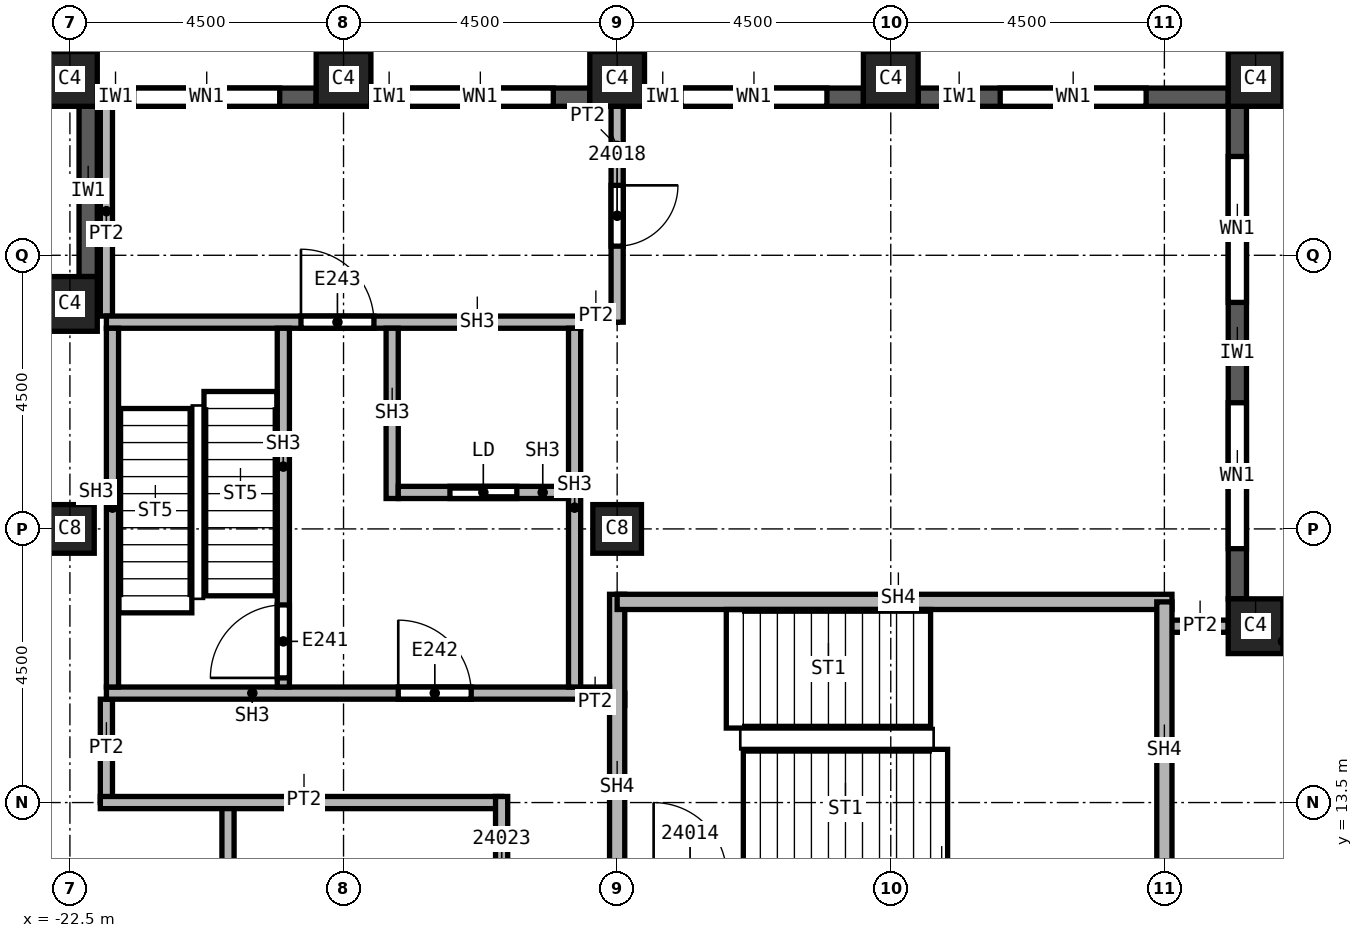
"""IFC4 building model, lengths in metres.
Left out: names, types, materials, properties, quantities, classifications, styles, units other than length and angle.
Written with IfcOpenShell. Run it as: python <this file> out.ifc"""

import sys

from ifc_helpers import new_model, si_unit, direction, frame, frame_2d, origin, origin_2d, place, context, subcontext, project, spatial, rectangle, extrude, element, fill, save


model = new_model("IFC4")
c1 = context("Model", 3, precision=1e-05, world=origin(), true_north=direction((0.0, 1.0)))
c2 = subcontext(c1, "Body", "Model", "MODEL_VIEW")
j1 = project(units=[si_unit("LENGTHUNIT", "METRE"), si_unit("PLANEANGLEUNIT", "RADIAN")], contexts=[c1])
p1 = place(None, origin())
s1 = spatial("IfcSite", under=j1, at=p1, CompositionType="ELEMENT")
p2 = place(p1, origin())
s2 = spatial("IfcBuilding", under=s1, at=p2, CompositionType="ELEMENT")
p3 = place(p2, frame((0.0, 0.0, 342.0)))
s3 = spatial("IfcBuildingStorey", under=s2, at=p3, CompositionType="ELEMENT", Elevation=342.0)
for number, where, z_axis, x_axis in (
    (1, (-13.5, 18.0, 0.0), (0.0, 0.0, 1.0), (1.0, 0.0, 0.0)),
    (2, (-22.5, 18.0, 0.0), (0.0, 0.0, 1.0), (1.0, 0.0, 0.0)),
):
    element("IfcColumn", number, at=place(p3, frame(where, z_axis=z_axis, x_axis=x_axis)), inside=s3, PredefinedType="COLUMN", context=c2, shape_type="SweptSolid", body=[
        extrude(rectangle(XDim=0.8, YDim=0.8, at=origin_2d()), origin(), (0.0, 0.0, 1.0), 3.74),
    ])
for number, where, z_axis, x_axis in (
    (3, (-3.0, 25.4, 0.0), (0.0, 0.0, 1.0), (1.0, 0.0, 0.0)),
    (4, (-9.0, 25.4, 0.0), (0.0, 0.0, 1.0), (1.0, 0.0, 0.0)),
    (5, (-13.5, 25.4, 0.0), (0.0, 0.0, 1.0), (1.0, 0.0, 0.0)),
    (6, (-18.0, 25.4, 0.0), (0.0, 0.0, 1.0), (1.0, 0.0, 0.0)),
    (7, (-22.5, 25.4, 0.0), (0.0, 0.0, 1.0), (1.0, 0.0, 0.0)),
    (8, (-3.0, 16.4, 0.0), (0.0, 0.0, 1.0), (1.0, 0.0, 0.0)),
    (9, (-22.5, 21.7, 0.0), (0.0, 0.0, 1.0), (1.0, 0.0, 0.0)),
):
    element("IfcColumn", number, at=place(p3, frame(where, z_axis=z_axis, x_axis=x_axis)), inside=s3, PredefinedType="COLUMN", context=c2, shape_type="SweptSolid", body=[
        extrude(rectangle(XDim=0.9, YDim=0.9, at=origin_2d()), origin(), (0.0, 0.0, 1.0), 3.74),
    ])
p4 = place(p3, frame((-3.3, 16.85, 0.0), z_axis=(0.0, 0.0, 1.0), x_axis=(0.0, 1.0, 0.0)))
e10 = element("IfcWall", 10, at=p4, inside=s3, PredefinedType="SOLIDWALL", context=c2, shape_type="SweptSolid", body=[
    extrude(rectangle(XDim=8.1, YDim=0.3, at=frame_2d((4.05, 0.0))), origin(), (0.0, 0.0, 1.0), 3.14),
])
p5 = place(p4, frame((0.825, 0.0, 0.8)))
e11 = element("IfcOpeningElement", 11, at=p5, cuts=e10, PredefinedType="OPENING", context=c2, shape_type="SweptSolid", body=[
    extrude(rectangle(XDim=2.4, YDim=1.95, at=frame_2d((1.2, 0.975))), frame((0.0, 0.15, 0.0), z_axis=(0.0, -1.0, 0.0), x_axis=(1.0, 0.0, 0.0)), (0.0, 0.0, 1.0), 0.3),
])
p6 = place(p4, frame((4.875, 0.0, 0.8)))
e12 = element("IfcOpeningElement", 12, at=p6, cuts=e10, PredefinedType="OPENING", context=c2, shape_type="SweptSolid", body=[
    extrude(rectangle(XDim=2.4, YDim=1.95, at=frame_2d((1.2, 0.975))), frame((0.0, 0.15, 0.0), z_axis=(0.0, -1.0, 0.0), x_axis=(1.0, 0.0, 0.0)), (0.0, 0.0, 1.0), 0.3),
])
p7 = place(p3, frame((-3.45, 25.1, 0.0), z_axis=(0.0, 0.0, 1.0), x_axis=(-1.0, 0.0, 0.0)))
e13 = element("IfcWall", 13, at=p7, inside=s3, PredefinedType="SOLIDWALL", context=c2, shape_type="SweptSolid", body=[
    extrude(rectangle(XDim=5.1, YDim=0.3, at=frame_2d((2.55, 0.0))), origin(), (0.0, 0.0, 1.0), 3.14),
])
p8 = place(p7, frame((1.35, 0.0, 0.8)))
e14 = element("IfcOpeningElement", 14, at=p8, cuts=e13, PredefinedType="OPENING", context=c2, shape_type="SweptSolid", body=[
    extrude(rectangle(XDim=2.4, YDim=1.95, at=frame_2d((1.2, 0.975))), frame((0.0, 0.15, 0.0), z_axis=(0.0, -1.0, 0.0), x_axis=(1.0, 0.0, 0.0)), (0.0, 0.0, 1.0), 0.3),
])
p9 = place(p3, frame((-9.45, 25.1, 0.0), z_axis=(0.0, 0.0, 1.0), x_axis=(-1.0, 0.0, 0.0)))
e15 = element("IfcWall", 15, at=p9, inside=s3, PredefinedType="SOLIDWALL", context=c2, shape_type="SweptSolid", body=[
    extrude(rectangle(XDim=3.6, YDim=0.3, at=frame_2d((1.8, 0.0))), origin(), (0.0, 0.0, 1.0), 3.14),
])
p10 = place(p9, frame((0.6, 0.0, 0.8)))
e16 = element("IfcOpeningElement", 16, at=p10, cuts=e15, PredefinedType="OPENING", context=c2, shape_type="SweptSolid", body=[
    extrude(rectangle(XDim=2.4, YDim=1.95, at=frame_2d((1.2, 0.975))), frame((0.0, 0.15, 0.0), z_axis=(0.0, -1.0, 0.0), x_axis=(1.0, 0.0, 0.0)), (0.0, 0.0, 1.0), 0.3),
])
p11 = place(p3, frame((-13.95, 25.1, 0.0), z_axis=(0.0, 0.0, 1.0), x_axis=(-1.0, 0.0, 0.0)))
e17 = element("IfcWall", 17, at=p11, inside=s3, PredefinedType="SOLIDWALL", context=c2, shape_type="SweptSolid", body=[
    extrude(rectangle(XDim=3.6, YDim=0.3, at=frame_2d((1.8, 0.0))), origin(), (0.0, 0.0, 1.0), 3.14),
])
p12 = place(p11, frame((0.6, 0.0, 0.8)))
e18 = element("IfcOpeningElement", 18, at=p12, cuts=e17, PredefinedType="OPENING", context=c2, shape_type="SweptSolid", body=[
    extrude(rectangle(XDim=2.4, YDim=1.95, at=frame_2d((1.2, 0.975))), frame((0.0, 0.15, 0.0), z_axis=(0.0, -1.0, 0.0), x_axis=(1.0, 0.0, 0.0)), (0.0, 0.0, 1.0), 0.3),
])
p13 = place(p3, frame((-18.45, 25.1, 0.0), z_axis=(0.0, 0.0, 1.0), x_axis=(-1.0, 0.0, 0.0)))
e19 = element("IfcWall", 19, at=p13, inside=s3, PredefinedType="SOLIDWALL", context=c2, shape_type="SweptSolid", body=[
    extrude(rectangle(XDim=3.6, YDim=0.3, at=frame_2d((1.8, 0.0))), origin(), (0.0, 0.0, 1.0), 3.14),
])
p14 = place(p13, frame((0.6, 0.0, 0.8)))
e20 = element("IfcOpeningElement", 20, at=p14, cuts=e19, PredefinedType="OPENING", context=c2, shape_type="SweptSolid", body=[
    extrude(rectangle(XDim=2.4, YDim=1.95, at=frame_2d((1.2, 0.975))), frame((0.0, 0.15, 0.0), z_axis=(0.0, -1.0, 0.0), x_axis=(1.0, 0.0, 0.0)), (0.0, 0.0, 1.0), 0.3),
])
p15 = place(p3, frame((-22.2, 24.95, 0.0), z_axis=(0.0, 0.0, 1.0), x_axis=(0.0, -1.0, 0.0)))
e21 = element("IfcWall", 21, at=p15, inside=s3, PredefinedType="SOLIDWALL", context=c2, shape_type="SweptSolid", body=[
    extrude(rectangle(XDim=2.8, YDim=0.3, at=frame_2d((1.4, 0.0))), origin(), (0.0, 0.0, 1.0), 3.14),
])
p16 = place(p3, frame((-21.9, 13.5, 0.0), z_axis=(0.0, 0.0, 1.0), x_axis=(0.0, 1.0, 0.0)))
e22 = element("IfcWall", 22, at=p16, inside=s3, PredefinedType="PARTITIONING", context=c2, shape_type="SweptSolid", body=[
    extrude(rectangle(XDim=1.7, YDim=0.2, at=frame_2d((0.85, 0.0))), origin(), (0.0, 0.0, 1.0), 3.74),
])
p17 = place(p3, frame((-21.9, 21.5, 0.0), z_axis=(0.0, 0.0, 1.0), x_axis=(0.0, 1.0, 0.0)))
e23 = element("IfcWall", 23, at=p17, inside=s3, PredefinedType="PARTITIONING", context=c2, shape_type="SweptSolid", body=[
    extrude(rectangle(XDim=3.45, YDim=0.2, at=frame_2d((1.725, 0.0))), origin(), (0.0, 0.0, 1.0), 3.74),
])
p18 = place(p3, frame((-19.9, -0.1, 0.0), z_axis=(0.0, 0.0, 1.0), x_axis=(0.0, 1.0, 0.0)))
e24 = element("IfcWall", 24, at=p18, inside=s3, PredefinedType="PARTITIONING", context=c2, shape_type="SweptSolid", body=[
    extrude(rectangle(XDim=13.6, YDim=0.2, at=frame_2d((6.8, 0.0))), origin(), (0.0, 0.0, 1.0), 3.74),
])
p19 = place(p18, frame((3.85, 0.0, 0.0)))
e25 = element("IfcOpeningElement", 25, at=p19, cuts=e24, PredefinedType="OPENING", context=c2, shape_type="SweptSolid", body=[
    extrude(rectangle(XDim=1.0, YDim=2.1, at=frame_2d((0.5, 1.05))), frame((0.0, 0.1, 0.0), z_axis=(0.0, -1.0, 0.0), x_axis=(1.0, 0.0, 0.0)), (0.0, 0.0, 1.0), 0.2),
])
p20 = place(p3, frame((-15.4, 13.5, 0.0), z_axis=(0.0, 0.0, 1.0), x_axis=(-1.0, 0.0, 0.0)))
e26 = element("IfcWall", 26, at=p20, inside=s3, PredefinedType="PARTITIONING", context=c2, shape_type="SweptSolid", body=[
    extrude(rectangle(XDim=6.6, YDim=0.2, at=frame_2d((3.3, 0.0))), origin(), (0.0, 0.0, 1.0), 3.74),
])
p21 = place(p3, frame((-15.4, -24.95, 0.0), z_axis=(0.0, 0.0, 1.0), x_axis=(0.0, 1.0, 0.0)))
e27 = element("IfcWall", 27, at=p21, inside=s3, PredefinedType="PARTITIONING", context=c2, shape_type="SweptSolid", body=[
    extrude(rectangle(XDim=38.55, YDim=0.2, at=frame_2d((19.275, 0.0))), origin(), (0.0, 0.0, 1.0), 3.74),
])
p22 = place(p21, frame((30.5, 0.0, 0.0)))
e28 = element("IfcOpeningElement", 28, at=p22, cuts=e27, PredefinedType="OPENING", context=c2, shape_type="SweptSolid", body=[
    extrude(rectangle(XDim=1.0, YDim=2.1, at=frame_2d((0.5, 1.05))), frame((0.0, 0.1, 0.0), z_axis=(0.0, -1.0, 0.0), x_axis=(1.0, 0.0, 0.0)), (0.0, 0.0, 1.0), 0.2),
])
p23 = place(p21, frame((36.35, 0.0, 0.0)))
e29 = element("IfcOpeningElement", 29, at=p23, cuts=e27, PredefinedType="OPENING", context=c2, shape_type="SweptSolid", body=[
    extrude(rectangle(XDim=1.0, YDim=2.1, at=frame_2d((0.5, 1.05))), frame((0.0, 0.1, 0.0), z_axis=(0.0, -1.0, 0.0), x_axis=(1.0, 0.0, 0.0)), (0.0, 0.0, 1.0), 0.2),
])
p24 = place(p21, frame((1.9, 0.0, 0.0)))
e30 = element("IfcOpeningElement", 30, at=p24, cuts=e27, PredefinedType="OPENING", context=c2, shape_type="SweptSolid", body=[
    extrude(rectangle(XDim=1.0, YDim=2.1, at=frame_2d((0.5, 1.05))), frame((0.0, 0.1, 0.0), z_axis=(0.0, -1.0, 0.0), x_axis=(1.0, 0.0, 0.0)), (0.0, 0.0, 1.0), 0.2),
])
p25 = place(p21, frame((5.6, 0.0, 0.0)))
e31 = element("IfcOpeningElement", 31, at=p25, cuts=e27, PredefinedType="OPENING", context=c2, shape_type="SweptSolid", body=[
    extrude(rectangle(XDim=1.0, YDim=2.1, at=frame_2d((0.5, 1.05))), frame((0.0, 0.1, 0.0), z_axis=(0.0, -1.0, 0.0), x_axis=(1.0, 0.0, 0.0)), (0.0, 0.0, 1.0), 0.2),
])
p26 = place(p21, frame((9.35, 0.0, 0.0)))
e32 = element("IfcOpeningElement", 32, at=p26, cuts=e27, PredefinedType="OPENING", context=c2, shape_type="SweptSolid", body=[
    extrude(rectangle(XDim=1.0, YDim=2.1, at=frame_2d((0.5, 1.05))), frame((0.0, 0.1, 0.0), z_axis=(0.0, -1.0, 0.0), x_axis=(1.0, 0.0, 0.0)), (0.0, 0.0, 1.0), 0.2),
])
p27 = place(p21, frame((16.1, 0.0, 0.0)))
e33 = element("IfcOpeningElement", 33, at=p27, cuts=e27, PredefinedType="OPENING", context=c2, shape_type="SweptSolid", body=[
    extrude(rectangle(XDim=1.0, YDim=2.1, at=frame_2d((0.5, 1.05))), frame((0.0, 0.1, 0.0), z_axis=(0.0, -1.0, 0.0), x_axis=(1.0, 0.0, 0.0)), (0.0, 0.0, 1.0), 0.2),
])
p28 = place(p3, frame((-14.1, 15.2, 0.0), z_axis=(0.0, 0.0, 1.0), x_axis=(1.0, 0.0, 0.0)))
e34 = element("IfcWall", 34, at=p28, inside=s3, PredefinedType="PARTITIONING", context=c2, shape_type="SweptSolid", body=[
    extrude(rectangle(XDim=0.725, YDim=0.2, at=frame_2d((0.363, 0.0))), origin(), (0.0, 0.0, 1.0), 3.74),
])
p29 = place(p3, frame((-13.5, 21.5, 0.0), z_axis=(0.0, 0.0, 1.0), x_axis=(-1.0, 0.0, 0.0)))
e35 = element("IfcWall", 35, at=p29, inside=s3, PredefinedType="PARTITIONING", context=c2, shape_type="SweptSolid", body=[
    extrude(rectangle(XDim=0.6, YDim=0.2, at=frame_2d((0.3, 0.0))), origin(), (0.0, 0.0, 1.0), 3.74),
])
p30 = place(p3, frame((-13.5, 24.95, 0.0), z_axis=(0.0, 0.0, 1.0), x_axis=(0.0, -1.0, 0.0)))
e36 = element("IfcWall", 36, at=p30, inside=s3, PredefinedType="PARTITIONING", context=c2, shape_type="SweptSolid", body=[
    extrude(rectangle(XDim=3.55, YDim=0.2, at=frame_2d((1.775, 0.0))), origin(), (0.0, 0.0, 1.0), 3.74),
])
p31 = place(p30, frame((1.3, 0.0, 0.0)))
e37 = element("IfcOpeningElement", 37, at=p31, cuts=e36, PredefinedType="OPENING", context=c2, shape_type="SweptSolid", body=[
    extrude(rectangle(XDim=1.0, YDim=2.1, at=frame_2d((0.5, 1.05))), frame((0.0, 0.1, 0.0), z_axis=(0.0, -1.0, 0.0), x_axis=(1.0, 0.0, 0.0)), (0.0, 0.0, 1.0), 0.2),
])
p32 = place(p3, frame((-4.5, 16.4, 0.0), z_axis=(0.0, 0.0, 1.0), x_axis=(1.0, 0.0, 0.0)))
e38 = element("IfcWall", 38, at=p32, inside=s3, PredefinedType="PARTITIONING", context=c2, shape_type="SweptSolid", body=[
    extrude(rectangle(XDim=1.05, YDim=0.2, at=frame_2d((0.525, 0.0))), origin(), (0.0, 0.0, 1.0), 3.74),
])
p33 = place(p3, frame((-13.5, 12.175, 0.0), z_axis=(0.0, 0.0, 1.0), x_axis=(0.0, 1.0, 0.0)))
e39 = element("IfcWall", 39, at=p33, inside=s3, PredefinedType="SOLIDWALL", context=c2, shape_type="SweptSolid", body=[
    extrude(rectangle(XDim=4.75, YDim=0.25, at=frame_2d((2.375, 0.0))), origin(), (0.0, 0.0, 1.0), 3.74),
])
p34 = place(p3, frame((-13.5, 16.8, 0.0), z_axis=(0.0, 0.0, 1.0), x_axis=(1.0, 0.0, 0.0)))
e40 = element("IfcWall", 40, at=p34, inside=s3, PredefinedType="SOLIDWALL", context=c2, shape_type="SweptSolid", body=[
    extrude(rectangle(XDim=9.125, YDim=0.25, at=frame_2d((4.562, 0.0))), origin(), (0.0, 0.0, 1.0), 3.74),
])
p35 = place(p3, frame((-4.5, 16.8, 0.0), z_axis=(0.0, 0.0, 1.0), x_axis=(0.0, -1.0, 0.0)))
e41 = element("IfcWall", 41, at=p35, inside=s3, PredefinedType="SOLIDWALL", context=c2, shape_type="SweptSolid", body=[
    extrude(rectangle(XDim=4.5, YDim=0.25, at=frame_2d((2.25, 0.0))), origin(), (0.0, 0.0, 1.0), 3.74),
])
p36 = place(p3, frame((-21.9, 15.3, 0.0), z_axis=(0.0, 0.0, 1.0), x_axis=(1.0, 0.0, 0.0)))
e42 = element("IfcWall", 42, at=p36, inside=s3, PredefinedType="SOLIDWALL", context=c2, shape_type="SweptSolid", body=[
    extrude(rectangle(XDim=8.275, YDim=0.2, at=frame_2d((4.137, 0.0))), origin(), (0.0, 0.0, 1.0), 3.74),
])
p37 = place(p36, frame((4.8, 0.0, 0.0)))
e43 = element("IfcOpeningElement", 43, at=p37, cuts=e42, PredefinedType="OPENING", context=c2, shape_type="SweptSolid", body=[
    extrude(rectangle(XDim=1.2, YDim=2.1, at=frame_2d((0.6, 1.05))), frame((0.0, 0.1, 0.0), z_axis=(0.0, -1.0, 0.0), x_axis=(1.0, 0.0, 0.0)), (0.0, 0.0, 1.0), 0.2),
])
p38 = place(p3, frame((-21.9, 21.4, 0.0), z_axis=(0.0, 0.0, 1.0), x_axis=(1.0, 0.0, 0.0)))
e44 = element("IfcWall", 44, at=p38, inside=s3, PredefinedType="SOLIDWALL", context=c2, shape_type="SweptSolid", body=[
    extrude(rectangle(XDim=7.8, YDim=0.2, at=frame_2d((3.9, 0.0))), origin(), (0.0, 0.0, 1.0), 3.74),
])
p39 = place(p38, frame((3.2, 0.0, 0.0)))
e45 = element("IfcOpeningElement", 45, at=p39, cuts=e44, PredefinedType="OPENING", context=c2, shape_type="SweptSolid", body=[
    extrude(rectangle(XDim=1.2, YDim=2.1, at=frame_2d((0.6, 1.05))), frame((0.0, 0.1, 0.0), z_axis=(0.0, -1.0, 0.0), x_axis=(1.0, 0.0, 0.0)), (0.0, 0.0, 1.0), 0.2),
])
for number, where, z_axis, x_axis in (
    (46, (-21.8, 15.4, 0.0), (0.0, 0.0, 1.0), (0.0, 1.0, 0.0)),
    (47, (-14.2, 15.4, 0.0), (0.0, 0.0, 1.0), (0.0, 1.0, 0.0)),
):
    element("IfcWall", number, at=place(p3, frame(where, z_axis=z_axis, x_axis=x_axis)), inside=s3, PredefinedType="SOLIDWALL", context=c2, shape_type="SweptSolid", body=[
        extrude(rectangle(XDim=5.9, YDim=0.2, at=frame_2d((2.95, 0.0))), origin(), (0.0, 0.0, 1.0), 3.74),
    ])
p40 = place(p3, frame((-18.99, 15.4, 0.0), z_axis=(0.0, 0.0, 1.0), x_axis=(0.0, 1.0, 0.0)))
e48 = element("IfcWall", 48, at=p40, inside=s3, PredefinedType="SOLIDWALL", context=c2, shape_type="SweptSolid", body=[
    extrude(rectangle(XDim=5.9, YDim=0.2, at=frame_2d((2.95, 0.0))), origin(), (0.0, 0.0, 1.0), 3.74),
])
p41 = place(p40, frame((0.15, 0.0, 0.0)))
e49 = element("IfcOpeningElement", 49, at=p41, cuts=e48, PredefinedType="OPENING", context=c2, shape_type="SweptSolid", body=[
    extrude(rectangle(XDim=1.2, YDim=2.1, at=frame_2d((0.6, 1.05))), frame((0.0, 0.1, 0.0), z_axis=(0.0, -1.0, 0.0), x_axis=(1.0, 0.0, 0.0)), (0.0, 0.0, 1.0), 0.2),
])
p42 = place(p3, frame((-17.2, 18.5, 0.0), z_axis=(0.0, 0.0, 1.0), x_axis=(0.0, 1.0, 0.0)))
e50 = element("IfcWall", 50, at=p42, inside=s3, PredefinedType="SOLIDWALL", context=c2, shape_type="SweptSolid", body=[
    extrude(rectangle(XDim=2.8, YDim=0.2, at=frame_2d((1.4, 0.0))), origin(), (0.0, 0.0, 1.0), 3.74),
])
p43 = place(p3, frame((-17.1, 18.6, 0.0), z_axis=(0.0, 0.0, 1.0), x_axis=(1.0, 0.0, 0.0)))
e51 = element("IfcWall", 51, at=p43, inside=s3, PredefinedType="SOLIDWALL", context=c2, shape_type="SweptSolid", body=[
    extrude(rectangle(XDim=2.8, YDim=0.2, at=frame_2d((1.4, 0.0))), origin(), (0.0, 0.0, 1.0), 3.74),
])
p44 = place(p43, frame((0.85, 0.0, 0.0)))
e52 = element("IfcOpeningElement", 52, at=p44, cuts=e51, PredefinedType="OPENING", context=c2, shape_type="SweptSolid", body=[
    extrude(rectangle(XDim=1.1, YDim=2.1, at=frame_2d((0.55, 1.05))), frame((0.0, 0.1, 0.0), z_axis=(0.0, -1.0, 0.0), x_axis=(1.0, 0.0, 0.0)), (0.0, 0.0, 1.0), 0.2),
])
p45 = place(p5, origin())
e53 = element("IfcWindow", 53, at=p45, inside=s3, PartitioningType="SINGLE_PANEL", PredefinedType="WINDOW", context=c2, shape_type="SweptSolid", body=[
    extrude(rectangle(XDim=2.4, YDim=1.95, at=frame_2d((1.2, 0.975))), frame((0.0, 0.03, 0.0), z_axis=(0.0, -1.0, 0.0), x_axis=(1.0, 0.0, 0.0)), (0.0, 0.0, 1.0), 0.06),
])
fill(e11, e53)
p46 = place(p6, origin())
e54 = element("IfcWindow", 54, at=p46, inside=s3, PartitioningType="SINGLE_PANEL", PredefinedType="WINDOW", context=c2, shape_type="SweptSolid", body=[
    extrude(rectangle(XDim=2.4, YDim=1.95, at=frame_2d((1.2, 0.975))), frame((0.0, 0.03, 0.0), z_axis=(0.0, -1.0, 0.0), x_axis=(1.0, 0.0, 0.0)), (0.0, 0.0, 1.0), 0.06),
])
fill(e12, e54)
p47 = place(p8, origin())
e55 = element("IfcWindow", 55, at=p47, inside=s3, PartitioningType="SINGLE_PANEL", PredefinedType="WINDOW", context=c2, shape_type="SweptSolid", body=[
    extrude(rectangle(XDim=2.4, YDim=1.95, at=frame_2d((1.2, 0.975))), frame((0.0, 0.03, 0.0), z_axis=(0.0, -1.0, 0.0), x_axis=(1.0, 0.0, 0.0)), (0.0, 0.0, 1.0), 0.06),
])
fill(e14, e55)
p48 = place(p10, origin())
e56 = element("IfcWindow", 56, at=p48, inside=s3, PartitioningType="SINGLE_PANEL", PredefinedType="WINDOW", context=c2, shape_type="SweptSolid", body=[
    extrude(rectangle(XDim=2.4, YDim=1.95, at=frame_2d((1.2, 0.975))), frame((0.0, 0.03, 0.0), z_axis=(0.0, -1.0, 0.0), x_axis=(1.0, 0.0, 0.0)), (0.0, 0.0, 1.0), 0.06),
])
fill(e16, e56)
p49 = place(p12, origin())
e57 = element("IfcWindow", 57, at=p49, inside=s3, PartitioningType="SINGLE_PANEL", PredefinedType="WINDOW", context=c2, shape_type="SweptSolid", body=[
    extrude(rectangle(XDim=2.4, YDim=1.95, at=frame_2d((1.2, 0.975))), frame((0.0, 0.03, 0.0), z_axis=(0.0, -1.0, 0.0), x_axis=(1.0, 0.0, 0.0)), (0.0, 0.0, 1.0), 0.06),
])
fill(e18, e57)
p50 = place(p14, origin())
e58 = element("IfcWindow", 58, at=p50, inside=s3, PartitioningType="SINGLE_PANEL", PredefinedType="WINDOW", context=c2, shape_type="SweptSolid", body=[
    extrude(rectangle(XDim=2.4, YDim=1.95, at=frame_2d((1.2, 0.975))), frame((0.0, 0.03, 0.0), z_axis=(0.0, -1.0, 0.0), x_axis=(1.0, 0.0, 0.0)), (0.0, 0.0, 1.0), 0.06),
])
fill(e20, e58)
p51 = place(p31, origin())
e59 = element("IfcDoor", 59, at=p51, inside=s3, OperationType="SINGLE_SWING_LEFT", PredefinedType="DOOR", context=c2, shape_type="SweptSolid", body=[
    extrude(rectangle(XDim=1.0, YDim=2.1, at=frame_2d((0.5, 1.05))), frame((0.0, 0.025, 0.0), z_axis=(0.0, -1.0, 0.0), x_axis=(1.0, 0.0, 0.0)), (0.0, 0.0, 1.0), 0.05),
])
fill(e37, e59)
p52 = place(p41, origin())
e60 = element("IfcDoor", 60, at=p52, inside=s3, OperationType="SINGLE_SWING_LEFT", PredefinedType="DOOR", context=c2, shape_type="SweptSolid", body=[
    extrude(rectangle(XDim=1.2, YDim=2.1, at=frame_2d((0.6, 1.05))), frame((0.0, 0.025, 0.0), z_axis=(0.0, -1.0, 0.0), x_axis=(1.0, 0.0, 0.0)), (0.0, 0.0, 1.0), 0.05),
])
fill(e49, e60)
p53 = place(p44, origin())
e61 = element("IfcDoor", 61, at=p53, inside=s3, OperationType="SLIDING_TO_LEFT", PredefinedType="DOOR", context=c2, shape_type="SweptSolid", body=[
    extrude(rectangle(XDim=1.1, YDim=2.1, at=frame_2d((0.55, 1.05))), frame((0.0, 0.025, 0.0), z_axis=(0.0, -1.0, 0.0), x_axis=(1.0, 0.0, 0.0)), (0.0, 0.0, 1.0), 0.05),
])
fill(e52, e61)
p54 = place(p37, origin())
e62 = element("IfcDoor", 62, at=p54, inside=s3, OperationType="SINGLE_SWING_RIGHT", PredefinedType="DOOR", context=c2, shape_type="SweptSolid", body=[
    extrude(rectangle(XDim=1.2, YDim=2.1, at=frame_2d((0.6, 1.05))), frame((0.0, 0.025, 0.0), z_axis=(0.0, -1.0, 0.0), x_axis=(1.0, 0.0, 0.0)), (0.0, 0.0, 1.0), 0.05),
])
fill(e43, e62)
p55 = place(p39, origin())
e63 = element("IfcDoor", 63, at=p55, inside=s3, OperationType="SINGLE_SWING_LEFT", PredefinedType="DOOR", context=c2, shape_type="SweptSolid", body=[
    extrude(rectangle(XDim=1.2, YDim=2.1, at=frame_2d((0.6, 1.05))), frame((0.0, 0.025, 0.0), z_axis=(0.0, -1.0, 0.0), x_axis=(1.0, 0.0, 0.0)), (0.0, 0.0, 1.0), 0.05),
])
fill(e45, e63)
save(model, sys.argv[1])
